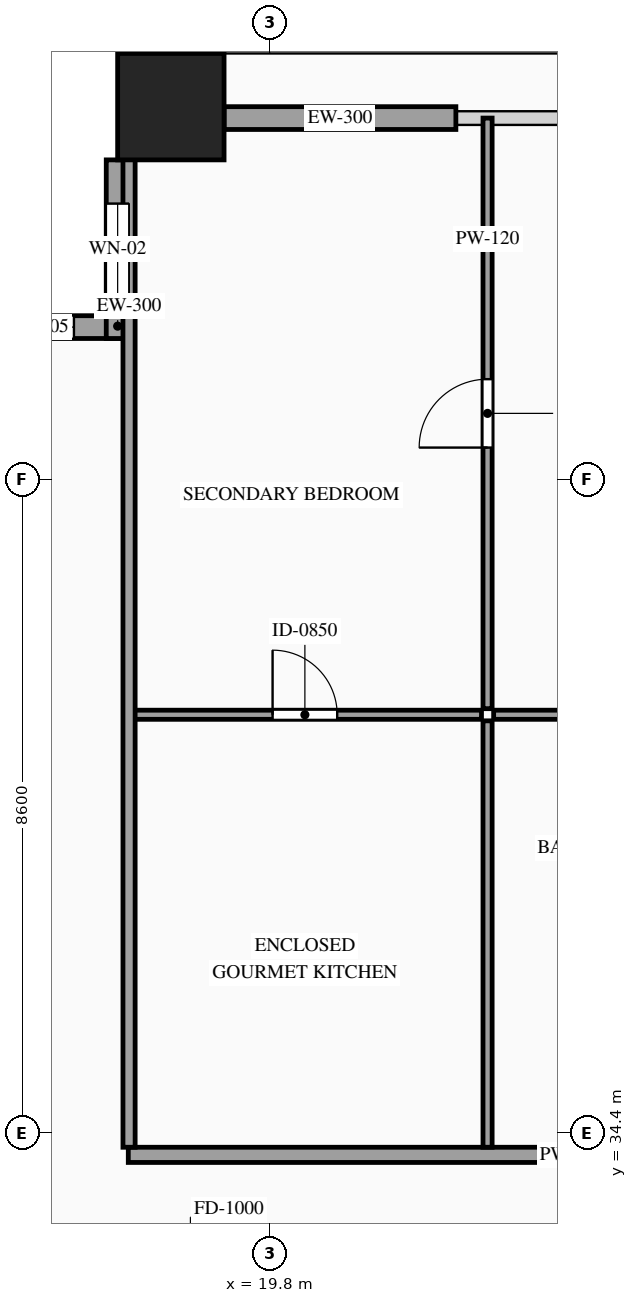
"""IFC4 building model, lengths in metres.
Left out: names, types, materials, properties, quantities, classifications, styles, units other than length and angle.
Written with IfcOpenShell. Run it as: python <this file> out.ifc"""

import sys

from ifc_helpers import new_model, si_unit, direction, frame, frame_2d, origin, origin_2d, place, context, subcontext, project, spatial, rectangle, hollow_rectangle, extrude, source, transform, mapped, element, fill, save


model = new_model("IFC4")
c1 = context("Model", 3, precision=1e-05, world=origin(), true_north=direction((0.0, 1.0)))
c2 = subcontext(c1, "Body", "Model", "MODEL_VIEW")
j1 = project(units=[si_unit("LENGTHUNIT", "METRE"), si_unit("PLANEANGLEUNIT", "RADIAN")], contexts=[c1])
p1 = place(None, origin())
s1 = spatial("IfcSite", under=j1, at=p1, CompositionType="ELEMENT")
p2 = place(p1, origin())
s2 = spatial("IfcBuilding", under=s1, at=p2, CompositionType="ELEMENT")
p3 = place(p2, frame((0.0, 0.0, 198.5)))
s3 = spatial("IfcBuildingStorey", under=s2, at=p3, CompositionType="ELEMENT", Elevation=198.5)
m1 = source(origin(), c2, "Body", "SweptSolid", [
    extrude(hollow_rectangle(XDim=1.4, YDim=1.4, WallThickness=0.06, at=origin_2d()), origin(), (0.0, 0.0, 1.0), 3.5),
])
p4 = place(p3, frame((18.5, 47.9, 0.0), z_axis=(0.0, 0.0, 1.0), x_axis=(1.0, 0.0, 0.0)))
e1 = element("IfcColumn", 1, at=p4, inside=s3, PredefinedType="COLUMN", context=c2, shape_type="MappedRepresentation", body=[
    mapped(m1, transform((0.0, 0.0, 0.0), scale=1.0)),
])
p5 = place(p3, frame((17.95, 45.0, 0.0), z_axis=(0.0, 0.0, 1.0), x_axis=(-1.0, 0.0, 0.0)))
e2 = element("IfcWall", 2, at=p5, inside=s3, PredefinedType="SOLIDWALL", context=c2, shape_type="SweptSolid", body=[
    extrude(rectangle(XDim=2.35, YDim=0.3, at=frame_2d((1.175, 0.0))), origin(), (0.0, 0.0, 1.0), 3.28),
])
p6 = place(p5, frame((0.725, 0.0, 0.85)))
e3 = element("IfcOpeningElement", 3, at=p6, cuts=e2, PredefinedType="OPENING", context=c2, shape_type="SweptSolid", body=[
    extrude(rectangle(XDim=0.9, YDim=1.5, at=frame_2d((0.45, 0.75))), frame((0.0, 0.165, 0.0), z_axis=(0.0, -1.0, 0.0), x_axis=(1.0, 0.0, 0.0)), (0.0, 0.0, 1.0), 0.33),
])
p7 = place(p3, frame((17.8, 47.2, 0.0), z_axis=(0.0, 0.0, 1.0), x_axis=(0.0, -1.0, 0.0)))
e4 = element("IfcWall", 4, at=p7, inside=s3, PredefinedType="SOLIDWALL", context=c2, shape_type="SweptSolid", body=[
    extrude(rectangle(XDim=2.35, YDim=0.3, at=frame_2d((1.175, 0.0))), origin(), (0.0, 0.0, 1.0), 3.28),
])
p8 = place(p7, frame((0.575, 0.0, 0.85)))
e5 = element("IfcOpeningElement", 5, at=p8, cuts=e4, PredefinedType="OPENING", context=c2, shape_type="SweptSolid", body=[
    extrude(rectangle(XDim=1.2, YDim=2.1, at=frame_2d((0.6, 1.05))), frame((0.0, 0.165, 0.0), z_axis=(0.0, -1.0, 0.0), x_axis=(1.0, 0.0, 0.0)), (0.0, 0.0, 1.0), 0.33),
])
m2 = source(origin(), c2, "Body", "SweptSolid", [
    extrude(rectangle(XDim=3.05, YDim=0.3, at=frame_2d((1.525, 0.0))), origin(), (0.0, 0.0, 1.0), 2.835),
])
p9 = place(p3, frame((19.2, 47.75, 0.0), z_axis=(0.0, 0.0, 1.0), x_axis=(1.0, 0.0, 0.0)))
e6 = element("IfcWall", 6, at=p9, inside=s3, PredefinedType="SOLIDWALL", context=c2, shape_type="MappedRepresentation", body=[
    mapped(m2, transform((0.0, 0.0, 0.0), scale=1.0)),
])
p10 = place(p3, frame((17.94, 34.11, 0.0), z_axis=(0.0, 0.0, 1.0), x_axis=(1.0, 0.0, 0.0)))
e7 = element("IfcWall", 7, at=p10, inside=s3, PredefinedType="PARTITIONING", context=c2, shape_type="SweptSolid", body=[
    extrude(rectangle(XDim=19.742, YDim=0.2, at=frame_2d((9.871, 0.0))), origin(), (0.0, 0.0, 1.0), 3.28),
])
p11 = place(p10, frame((11.915, 0.0, 0.0)))
e8 = element("IfcOpeningElement", 8, at=p11, cuts=e7, PredefinedType="OPENING", context=c2, shape_type="SweptSolid", body=[
    extrude(rectangle(XDim=1.0, YDim=2.2, at=frame_2d((0.5, 1.1))), frame((0.0, 0.115, 0.0), z_axis=(0.0, -1.0, 0.0), x_axis=(1.0, 0.0, 0.0)), (0.0, 0.0, 1.0), 0.23),
])
p12 = place(p3, frame((17.94, 39.9, 0.0), z_axis=(0.0, 0.0, 1.0), x_axis=(1.0, 0.0, 0.0)))
e9 = element("IfcWall", 9, at=p12, inside=s3, PredefinedType="PARTITIONING", context=c2, shape_type="SweptSolid", body=[
    extrude(rectangle(XDim=4.647, YDim=0.12, at=frame_2d((2.323, 0.0))), origin(), (0.0, 0.0, 1.0), 3.28),
])
p13 = place(p12, frame((1.898, 0.0, 0.0)))
e10 = element("IfcOpeningElement", 10, at=p13, cuts=e9, PredefinedType="OPENING", context=c2, shape_type="SweptSolid", body=[
    extrude(rectangle(XDim=0.85, YDim=2.1, at=frame_2d((0.425, 1.05))), frame((0.0, 0.075, 0.0), z_axis=(0.0, -1.0, 0.0), x_axis=(1.0, 0.0, 0.0)), (0.0, 0.0, 1.0), 0.15),
])
m3 = source(origin(), c2, "Body", "SweptSolid", [
    extrude(rectangle(XDim=5.61, YDim=0.12, at=frame_2d((2.805, 0.0))), origin(), (0.0, 0.0, 1.0), 3.28),
])
p14 = place(p3, frame((22.667, 34.21, 0.0), z_axis=(0.0, 0.0, 1.0), x_axis=(0.0, 1.0, 0.0)))
e11 = element("IfcWall", 11, at=p14, inside=s3, PredefinedType="PARTITIONING", context=c2, shape_type="MappedRepresentation", body=[
    mapped(m3, transform((0.0, 0.0, 0.0), scale=1.0)),
])
p15 = place(p3, frame((22.667, 39.98, 0.0), z_axis=(0.0, 0.0, 1.0), x_axis=(0.0, 1.0, 0.0)))
e12 = element("IfcWall", 12, at=p15, inside=s3, PredefinedType="PARTITIONING", context=c2, shape_type="SweptSolid", body=[
    extrude(rectangle(XDim=7.77, YDim=0.12, at=frame_2d((3.885, 0.0))), origin(), (0.0, 0.0, 1.0), 3.28),
])
p16 = place(p15, frame((3.435, 0.0, 0.0)))
e13 = element("IfcOpeningElement", 13, at=p16, cuts=e12, PredefinedType="OPENING", context=c2, shape_type="SweptSolid", body=[
    extrude(rectangle(XDim=0.9, YDim=2.15, at=frame_2d((0.45, 1.075))), frame((0.0, 0.075, 0.0), z_axis=(0.0, -1.0, 0.0), x_axis=(1.0, 0.0, 0.0)), (0.0, 0.0, 1.0), 0.15),
])
m4 = source(origin(), c2, "Body", "SweptSolid", [
    extrude(rectangle(XDim=4.928, YDim=0.12, at=frame_2d((2.464, 0.0))), origin(), (0.0, 0.0, 1.0), 2.875),
])
p17 = place(p3, frame((22.747, 39.9, 0.0), z_axis=(0.0, 0.0, 1.0), x_axis=(1.0, 0.0, 0.0)))
e14 = element("IfcWall", 14, at=p17, inside=s3, PredefinedType="PARTITIONING", context=c2, shape_type="MappedRepresentation", body=[
    mapped(m4, transform((0.0, 0.0, 0.0), scale=1.0)),
])
m5 = source(origin(), c2, "Body", "SweptSolid", [
    extrude(rectangle(XDim=13.39, YDim=0.16, at=frame_2d((6.695, 0.0))), origin(), (0.0, 0.0, 1.0), 3.28),
])
p18 = place(p3, frame((17.95, 34.21, 0.0), z_axis=(0.0, 0.0, 1.0), x_axis=(0.0, 1.0, 0.0)))
e15 = element("IfcWall", 15, at=p18, inside=s3, PredefinedType="PARTITIONING", context=c2, shape_type="MappedRepresentation", body=[
    mapped(m5, transform((0.0, 0.0, 0.0), scale=1.0)),
])
m6 = source(origin(), c2, "Body", "SweptSolid", [
    extrude(rectangle(XDim=0.9, YDim=1.5, at=frame_2d((0.45, 0.75))), frame((0.0, 0.03, 0.0), z_axis=(0.0, -1.0, 0.0), x_axis=(1.0, 0.0, 0.0)), (0.0, 0.0, 1.0), 0.06),
])
p19 = place(p6, origin())
e16 = element("IfcWindow", 16, at=p19, inside=s3, PartitioningType="SINGLE_PANEL", PredefinedType="WINDOW", context=c2, shape_type="MappedRepresentation", body=[
    mapped(m6, transform((0.0, 0.0, 0.0), scale=1.0)),
])
fill(e3, e16)
m7 = source(origin(), c2, "Body", "SweptSolid", [
    extrude(rectangle(XDim=1.2, YDim=2.1, at=frame_2d((0.6, 1.05))), frame((0.0, 0.03, 0.0), z_axis=(0.0, -1.0, 0.0), x_axis=(1.0, 0.0, 0.0)), (0.0, 0.0, 1.0), 0.06),
])
p20 = place(p8, origin())
e17 = element("IfcWindow", 17, at=p20, inside=s3, PartitioningType="SINGLE_PANEL", PredefinedType="WINDOW", context=c2, shape_type="MappedRepresentation", body=[
    mapped(m7, transform((0.0, 0.0, 0.0), scale=1.0)),
])
fill(e5, e17)
m8 = source(origin(), c2, "Body", "SweptSolid", [
    extrude(rectangle(XDim=0.85, YDim=2.1, at=frame_2d((0.425, 1.05))), frame((0.0, 0.025, 0.0), z_axis=(0.0, -1.0, 0.0), x_axis=(1.0, 0.0, 0.0)), (0.0, 0.0, 1.0), 0.05),
])
p21 = place(p13, origin())
e18 = element("IfcDoor", 18, at=p21, inside=s3, OperationType="SINGLE_SWING_LEFT", PredefinedType="DOOR", context=c2, shape_type="MappedRepresentation", body=[
    mapped(m8, transform((0.0, 0.0, 0.0), scale=1.0)),
])
fill(e10, e18)
m9 = source(origin(), c2, "Body", "SweptSolid", [
    extrude(rectangle(XDim=0.9, YDim=2.15, at=frame_2d((0.45, 1.075))), frame((0.0, 0.025, 0.0), z_axis=(0.0, -1.0, 0.0), x_axis=(1.0, 0.0, 0.0)), (0.0, 0.0, 1.0), 0.05),
])
p22 = place(p16, origin())
e19 = element("IfcDoor", 19, at=p22, inside=s3, OperationType="SINGLE_SWING_LEFT", PredefinedType="DOOR", context=c2, shape_type="MappedRepresentation", body=[
    mapped(m9, transform((0.0, 0.0, 0.0), scale=1.0)),
])
fill(e13, e19)
save(model, sys.argv[1])
